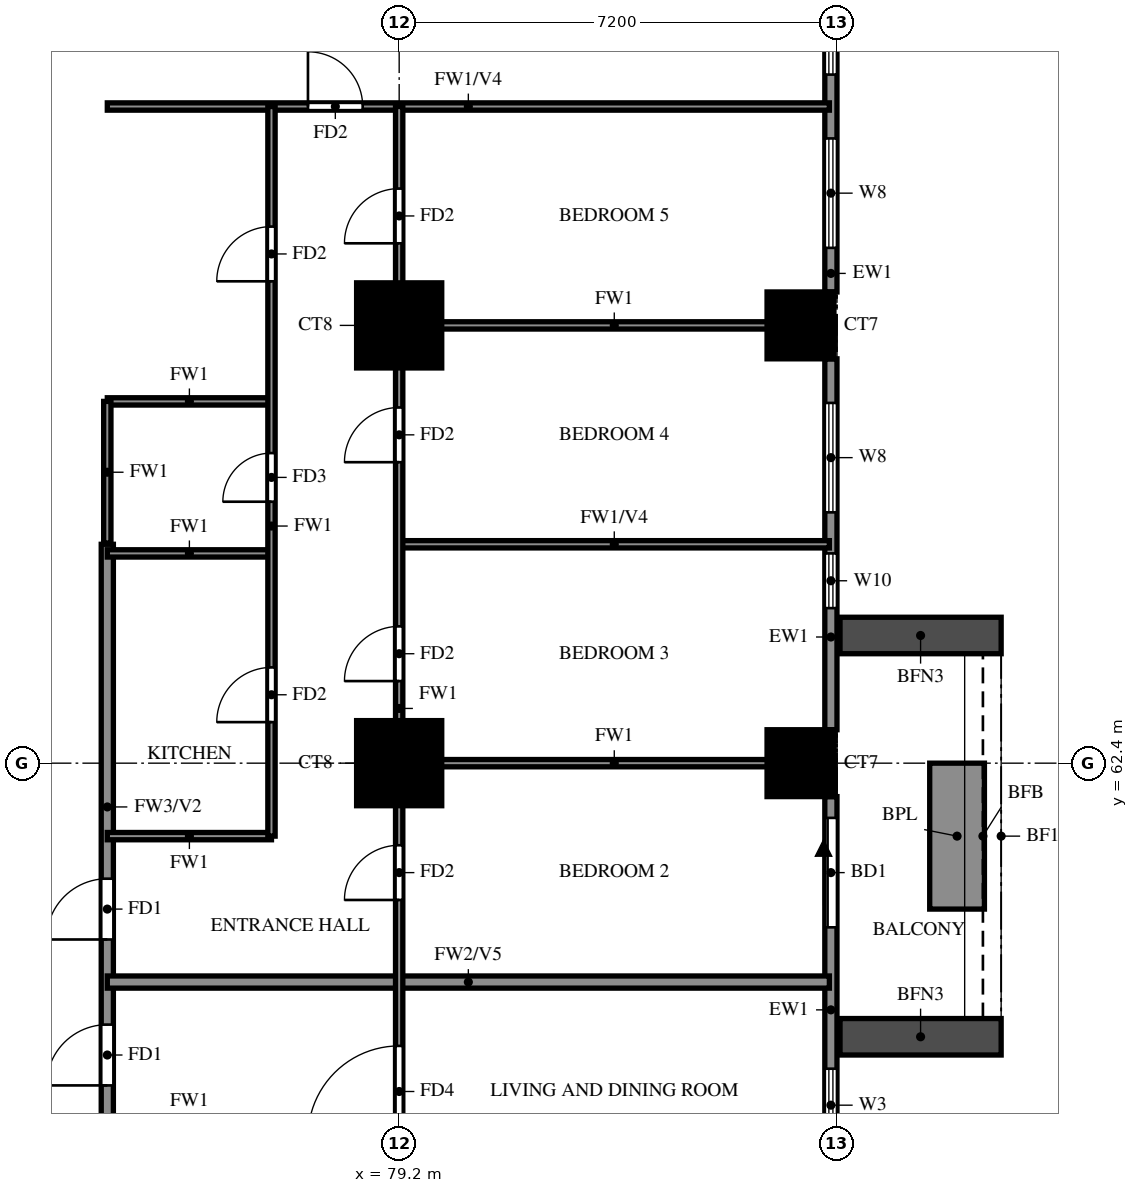
"""IFC4 building model, lengths in metres.
Left out: names, types, materials, properties, quantities, classifications, styles, units other than length and angle.
Written with IfcOpenShell. Run it as: python <this file> out.ifc"""

import sys

from ifc_helpers import new_model, si_unit, direction, frame, frame_2d, origin, origin_2d, place, context, subcontext, project, spatial, rectangle, extrude, source, transform, mapped, element, fill, save


model = new_model("IFC4")
c1 = context("Model", 3, precision=1e-05, world=origin(), true_north=direction((0.0, 1.0)))
c2 = subcontext(c1, "Body", "Model", "MODEL_VIEW")
j1 = project(units=[si_unit("LENGTHUNIT", "METRE"), si_unit("PLANEANGLEUNIT", "RADIAN")], contexts=[c1])
p1 = place(None, origin())
s1 = spatial("IfcSite", under=j1, at=p1, CompositionType="ELEMENT")
p2 = place(p1, origin())
s2 = spatial("IfcBuilding", under=s1, at=p2, CompositionType="ELEMENT")
p3 = place(p2, frame((0.0, 0.0, 34.0)))
s3 = spatial("IfcBuildingStorey", under=s2, at=p3, CompositionType="ELEMENT", Elevation=34.0)
m1 = source(origin(), c2, "Body", "SweptSolid", [
    extrude(rectangle(XDim=1.4, YDim=1.4, at=origin_2d()), origin(), (0.0, 0.0, 1.0), 3.18),
])
p4 = place(p3, frame((79.2, 62.4, 0.0), z_axis=(0.0, 0.0, 1.0), x_axis=(1.0, 0.0, 0.0)))
e1 = element("IfcColumn", 1, at=p4, inside=s3, PredefinedType="COLUMN", context=c2, shape_type="MappedRepresentation", body=[
    mapped(m1, transform((0.0, 0.0, 0.0))),
])
m2 = source(origin(), c2, "Body", "SweptSolid", [
    extrude(rectangle(XDim=1.1, YDim=1.1, at=origin_2d()), origin(), (0.0, 0.0, 1.0), 3.18),
])
p5 = place(p3, frame((85.8, 62.4, 0.0), z_axis=(0.0, 0.0, 1.0), x_axis=(1.0, 0.0, 0.0)))
e2 = element("IfcColumn", 2, at=p5, inside=s3, PredefinedType="COLUMN", context=c2, shape_type="MappedRepresentation", body=[
    mapped(m2, transform((0.0, 0.0, 0.0))),
])
p6 = place(p3, frame((79.2, 69.6, 0.0), z_axis=(0.0, 0.0, 1.0), x_axis=(1.0, 0.0, 0.0)))
e3 = element("IfcColumn", 3, at=p6, inside=s3, PredefinedType="COLUMN", context=c2, shape_type="MappedRepresentation", body=[
    mapped(m1, transform((0.0, 0.0, 0.0))),
])
p7 = place(p3, frame((85.8, 69.6, 0.0), z_axis=(0.0, 0.0, 1.0), x_axis=(1.0, 0.0, 0.0)))
e4 = element("IfcColumn", 4, at=p7, inside=s3, PredefinedType="COLUMN", context=c2, shape_type="MappedRepresentation", body=[
    mapped(m2, transform((0.0, 0.0, 0.0))),
])
p8 = place(p3, frame((86.3, 55.75, 0.0), z_axis=(0.0, 0.0, 1.0), x_axis=(0.0, 1.0, 0.0)))
e5 = element("IfcWall", 5, at=p8, inside=s3, PredefinedType="SOLIDWALL", context=c2, shape_type="SweptSolid", body=[
    extrude(rectangle(XDim=6.1, YDim=0.2, at=frame_2d((3.05, 0.0))), origin(), (0.0, 0.0, 1.0), 3.18),
])
p9 = place(p8, frame((3.95, 0.0, 0.0)))
e6 = element("IfcOpeningElement", 6, at=p9, cuts=e5, PredefinedType="OPENING", context=c2, shape_type="SweptSolid", body=[
    extrude(rectangle(XDim=1.8, YDim=2.4, at=frame_2d((0.9, 1.2))), frame((0.0, 0.11, 0.0), z_axis=(0.0, -1.0, 0.0), x_axis=(1.0, 0.0, 0.0)), (0.0, 0.0, 1.0), 0.22),
])
p10 = place(p8, frame((0.425, 0.0, 0.6)))
e7 = element("IfcOpeningElement", 7, at=p10, cuts=e5, PredefinedType="OPENING", context=c2, shape_type="SweptSolid", body=[
    extrude(rectangle(XDim=1.2, YDim=2.4, at=frame_2d((0.6, 1.2))), frame((0.0, 0.11, 0.0), z_axis=(0.0, -1.0, 0.0), x_axis=(1.0, 0.0, 0.0)), (0.0, 0.0, 1.0), 0.22),
])
p11 = place(p3, frame((86.3, 62.95, 0.0), z_axis=(0.0, 0.0, 1.0), x_axis=(0.0, 1.0, 0.0)))
e8 = element("IfcWall", 8, at=p11, inside=s3, PredefinedType="SOLIDWALL", context=c2, shape_type="SweptSolid", body=[
    extrude(rectangle(XDim=6.1, YDim=0.2, at=frame_2d((3.05, 0.0))), origin(), (0.0, 0.0, 1.0), 3.18),
])
p12 = place(p11, frame((2.0, 0.0, 0.6)))
e9 = element("IfcOpeningElement", 9, at=p12, cuts=e8, PredefinedType="OPENING", context=c2, shape_type="SweptSolid", body=[
    extrude(rectangle(XDim=0.9, YDim=2.4, at=frame_2d((0.45, 1.2))), frame((0.0, 0.11, 0.0), z_axis=(0.0, -1.0, 0.0), x_axis=(1.0, 0.0, 0.0)), (0.0, 0.0, 1.0), 0.22),
])
p13 = place(p11, frame((3.575, 0.0, 0.6)))
e10 = element("IfcOpeningElement", 10, at=p13, cuts=e8, PredefinedType="OPENING", context=c2, shape_type="SweptSolid", body=[
    extrude(rectangle(XDim=1.8, YDim=2.4, at=frame_2d((0.9, 1.2))), frame((0.0, 0.11, 0.0), z_axis=(0.0, -1.0, 0.0), x_axis=(1.0, 0.0, 0.0)), (0.0, 0.0, 1.0), 0.22),
])
p14 = place(p3, frame((86.3, 70.15, 0.0), z_axis=(0.0, 0.0, 1.0), x_axis=(0.0, 1.0, 0.0)))
e11 = element("IfcWall", 11, at=p14, inside=s3, PredefinedType="SOLIDWALL", context=c2, shape_type="SweptSolid", body=[
    extrude(rectangle(XDim=6.1, YDim=0.2, at=frame_2d((3.05, 0.0))), origin(), (0.0, 0.0, 1.0), 3.18),
])
p15 = place(p14, frame((0.725, 0.0, 0.6)))
e12 = element("IfcOpeningElement", 12, at=p15, cuts=e11, PredefinedType="OPENING", context=c2, shape_type="SweptSolid", body=[
    extrude(rectangle(XDim=1.8, YDim=2.4, at=frame_2d((0.9, 1.2))), frame((0.0, 0.11, 0.0), z_axis=(0.0, -1.0, 0.0), x_axis=(1.0, 0.0, 0.0)), (0.0, 0.0, 1.0), 0.22),
])
p16 = place(p14, frame((3.575, 0.0, 0.6)))
e13 = element("IfcOpeningElement", 13, at=p16, cuts=e11, PredefinedType="OPENING", context=c2, shape_type="SweptSolid", body=[
    extrude(rectangle(XDim=1.8, YDim=2.4, at=frame_2d((0.9, 1.2))), frame((0.0, 0.11, 0.0), z_axis=(0.0, -1.0, 0.0), x_axis=(1.0, 0.0, 0.0)), (0.0, 0.0, 1.0), 0.22),
])
for number, where, z_axis, x_axis in (
    (14, (86.45, 57.9, 0.0), (0.0, 0.0, 1.0), (1.0, 0.0, 0.0)),
    (15, (86.45, 64.5, 0.0), (0.0, 0.0, 1.0), (1.0, 0.0, 0.0)),
):
    element("IfcWall", number, at=place(p3, frame(where, z_axis=z_axis, x_axis=x_axis)), inside=s3, PredefinedType="SOLIDWALL", context=c2, shape_type="SweptSolid", body=[
        extrude(rectangle(XDim=2.65, YDim=0.6, at=frame_2d((1.325, 0.0))), origin(), (0.0, 0.0, 1.0), 2.85),
    ])
p17 = place(p3, frame((88.375, 60.0, 0.0), z_axis=(0.0, 0.0, 1.0), x_axis=(0.0, 1.0, 0.0)))
e16 = element("IfcWall", 16, at=p17, inside=s3, PredefinedType="SOLIDWALL", context=c2, shape_type="SweptSolid", body=[
    extrude(rectangle(XDim=2.4, YDim=0.9, at=frame_2d((1.2, 0.0))), origin(), (0.0, 0.0, 1.0), 0.9),
])
p18 = place(p3, frame((74.4, 56.4, 0.0), z_axis=(0.0, 0.0, 1.0), x_axis=(0.0, 1.0, 0.0)))
e17 = element("IfcWall", 17, at=p18, inside=s3, PredefinedType="SOLIDWALL", context=c2, shape_type="SweptSolid", body=[
    extrude(rectangle(XDim=9.6, YDim=0.2, at=frame_2d((4.8, 0.0))), origin(), (0.0, 0.0, 1.0), 3.18),
])
p19 = place(p18, frame((0.7, 0.0, 0.0)))
e18 = element("IfcOpeningElement", 18, at=p19, cuts=e17, PredefinedType="OPENING", context=c2, shape_type="SweptSolid", body=[
    extrude(rectangle(XDim=1.0, YDim=2.1, at=frame_2d((0.5, 1.05))), frame((0.0, 0.11, 0.0), z_axis=(0.0, -1.0, 0.0), x_axis=(1.0, 0.0, 0.0)), (0.0, 0.0, 1.0), 0.22),
])
p20 = place(p18, frame((3.1, 0.0, 0.0)))
e19 = element("IfcOpeningElement", 19, at=p20, cuts=e17, PredefinedType="OPENING", context=c2, shape_type="SweptSolid", body=[
    extrude(rectangle(XDim=1.0, YDim=2.1, at=frame_2d((0.5, 1.05))), frame((0.0, 0.11, 0.0), z_axis=(0.0, -1.0, 0.0), x_axis=(1.0, 0.0, 0.0)), (0.0, 0.0, 1.0), 0.22),
])
p21 = place(p3, frame((74.4, 58.8, 0.0), z_axis=(0.0, 0.0, 1.0), x_axis=(1.0, 0.0, 0.0)))
e20 = element("IfcWall", 20, at=p21, inside=s3, PredefinedType="SOLIDWALL", context=c2, shape_type="SweptSolid", body=[
    extrude(rectangle(XDim=11.875, YDim=0.2, at=frame_2d((5.938, 0.0))), origin(), (0.0, 0.0, 1.0), 2.28),
])
p22 = place(p3, frame((74.4, 61.2, 0.0), z_axis=(0.0, 0.0, 1.0), x_axis=(1.0, 0.0, 0.0)))
e21 = element("IfcWall", 21, at=p22, inside=s3, PredefinedType="PARTITIONING", context=c2, shape_type="SweptSolid", body=[
    extrude(rectangle(XDim=2.7, YDim=0.12, at=frame_2d((1.35, 0.0))), origin(), (0.0, 0.0, 1.0), 3.18),
])
p23 = place(p3, frame((79.2, 62.4, 0.0), z_axis=(0.0, 0.0, 1.0), x_axis=(1.0, 0.0, 0.0)))
e22 = element("IfcWall", 22, at=p23, inside=s3, PredefinedType="PARTITIONING", context=c2, shape_type="SweptSolid", body=[
    extrude(rectangle(XDim=7.075, YDim=0.12, at=frame_2d((3.538, 0.0))), origin(), (0.0, 0.0, 1.0), 3.18),
])
p24 = place(p3, frame((74.4, 65.85, 0.0), z_axis=(0.0, 0.0, 1.0), x_axis=(1.0, 0.0, 0.0)))
e23 = element("IfcWall", 23, at=p24, inside=s3, PredefinedType="PARTITIONING", context=c2, shape_type="SweptSolid", body=[
    extrude(rectangle(XDim=2.7, YDim=0.12, at=frame_2d((1.35, 0.0))), origin(), (0.0, 0.0, 1.0), 3.18),
])
p25 = place(p3, frame((79.2, 66.0, 0.0), z_axis=(0.0, 0.0, 1.0), x_axis=(1.0, 0.0, 0.0)))
e24 = element("IfcWall", 24, at=p25, inside=s3, PredefinedType="PARTITIONING", context=c2, shape_type="SweptSolid", body=[
    extrude(rectangle(XDim=7.075, YDim=0.12, at=frame_2d((3.538, 0.0))), origin(), (0.0, 0.0, 1.0), 2.28),
])
p26 = place(p3, frame((74.4, 68.35, 0.0), z_axis=(0.0, 0.0, 1.0), x_axis=(1.0, 0.0, 0.0)))
e25 = element("IfcWall", 25, at=p26, inside=s3, PredefinedType="PARTITIONING", context=c2, shape_type="SweptSolid", body=[
    extrude(rectangle(XDim=2.7, YDim=0.12, at=frame_2d((1.35, 0.0))), origin(), (0.0, 0.0, 1.0), 3.18),
])
p27 = place(p3, frame((79.2, 69.6, 0.0), z_axis=(0.0, 0.0, 1.0), x_axis=(1.0, 0.0, 0.0)))
e26 = element("IfcWall", 26, at=p27, inside=s3, PredefinedType="PARTITIONING", context=c2, shape_type="SweptSolid", body=[
    extrude(rectangle(XDim=7.075, YDim=0.12, at=frame_2d((3.538, 0.0))), origin(), (0.0, 0.0, 1.0), 3.18),
])
p28 = place(p3, frame((74.4, 73.2, 0.0), z_axis=(0.0, 0.0, 1.0), x_axis=(1.0, 0.0, 0.0)))
e27 = element("IfcWall", 27, at=p28, inside=s3, PredefinedType="PARTITIONING", context=c2, shape_type="SweptSolid", body=[
    extrude(rectangle(XDim=11.875, YDim=0.12, at=frame_2d((5.938, 0.0))), origin(), (0.0, 0.0, 1.0), 2.28),
])
p29 = place(p28, frame((3.3, 0.0, 0.0)))
e28 = element("IfcOpeningElement", 28, at=p29, cuts=e27, PredefinedType="OPENING", context=c2, shape_type="SweptSolid", body=[
    extrude(rectangle(XDim=0.9, YDim=2.1, at=frame_2d((0.45, 1.05))), frame((0.0, 0.07, 0.0), z_axis=(0.0, -1.0, 0.0), x_axis=(1.0, 0.0, 0.0)), (0.0, 0.0, 1.0), 0.14),
])
p30 = place(p3, frame((74.4, 66.02, 0.0), z_axis=(0.0, 0.0, 1.0), x_axis=(0.0, 1.0, 0.0)))
e29 = element("IfcWall", 29, at=p30, inside=s3, PredefinedType="PARTITIONING", context=c2, shape_type="SweptSolid", body=[
    extrude(rectangle(XDim=2.33, YDim=0.12, at=frame_2d((1.165, 0.0))), origin(), (0.0, 0.0, 1.0), 3.18),
])
p31 = place(p3, frame((77.1, 61.2, 0.0), z_axis=(0.0, 0.0, 1.0), x_axis=(0.0, 1.0, 0.0)))
e30 = element("IfcWall", 30, at=p31, inside=s3, PredefinedType="PARTITIONING", context=c2, shape_type="SweptSolid", body=[
    extrude(rectangle(XDim=12.0, YDim=0.12, at=frame_2d((6.0, 0.0))), origin(), (0.0, 0.0, 1.0), 3.18),
])
p32 = place(p31, frame((1.875, 0.0, 0.0)))
e31 = element("IfcOpeningElement", 31, at=p32, cuts=e30, PredefinedType="OPENING", context=c2, shape_type="SweptSolid", body=[
    extrude(rectangle(XDim=0.9, YDim=2.1, at=frame_2d((0.45, 1.05))), frame((0.0, 0.07, 0.0), z_axis=(0.0, -1.0, 0.0), x_axis=(1.0, 0.0, 0.0)), (0.0, 0.0, 1.0), 0.14),
])
p33 = place(p31, frame((5.5, 0.0, 0.0)))
e32 = element("IfcOpeningElement", 32, at=p33, cuts=e30, PredefinedType="OPENING", context=c2, shape_type="SweptSolid", body=[
    extrude(rectangle(XDim=0.8, YDim=2.1, at=frame_2d((0.4, 1.05))), frame((0.0, 0.07, 0.0), z_axis=(0.0, -1.0, 0.0), x_axis=(1.0, 0.0, 0.0)), (0.0, 0.0, 1.0), 0.14),
])
p34 = place(p31, frame((9.125, 0.0, 0.0)))
e33 = element("IfcOpeningElement", 33, at=p34, cuts=e30, PredefinedType="OPENING", context=c2, shape_type="SweptSolid", body=[
    extrude(rectangle(XDim=0.9, YDim=2.1, at=frame_2d((0.45, 1.05))), frame((0.0, 0.07, 0.0), z_axis=(0.0, -1.0, 0.0), x_axis=(1.0, 0.0, 0.0)), (0.0, 0.0, 1.0), 0.14),
])
p35 = place(p3, frame((79.2, 55.2, 0.0), z_axis=(0.0, 0.0, 1.0), x_axis=(0.0, 1.0, 0.0)))
e34 = element("IfcWall", 34, at=p35, inside=s3, PredefinedType="PARTITIONING", context=c2, shape_type="SweptSolid", body=[
    extrude(rectangle(XDim=18.0, YDim=0.12, at=frame_2d((9.0, 0.0))), origin(), (0.0, 0.0, 1.0), 3.18),
])
p36 = place(p35, frame((1.05, 0.0, 0.0)))
e35 = element("IfcOpeningElement", 35, at=p36, cuts=e34, PredefinedType="OPENING", context=c2, shape_type="SweptSolid", body=[
    extrude(rectangle(XDim=1.5, YDim=2.1, at=frame_2d((0.75, 1.05))), frame((0.0, 0.07, 0.0), z_axis=(0.0, -1.0, 0.0), x_axis=(1.0, 0.0, 0.0)), (0.0, 0.0, 1.0), 0.14),
])
p37 = place(p35, frame((4.95, 0.0, 0.0)))
e36 = element("IfcOpeningElement", 36, at=p37, cuts=e34, PredefinedType="OPENING", context=c2, shape_type="SweptSolid", body=[
    extrude(rectangle(XDim=0.9, YDim=2.1, at=frame_2d((0.45, 1.05))), frame((0.0, 0.07, 0.0), z_axis=(0.0, -1.0, 0.0), x_axis=(1.0, 0.0, 0.0)), (0.0, 0.0, 1.0), 0.14),
])
p38 = place(p35, frame((8.55, 0.0, 0.0)))
e37 = element("IfcOpeningElement", 37, at=p38, cuts=e34, PredefinedType="OPENING", context=c2, shape_type="SweptSolid", body=[
    extrude(rectangle(XDim=0.9, YDim=2.1, at=frame_2d((0.45, 1.05))), frame((0.0, 0.07, 0.0), z_axis=(0.0, -1.0, 0.0), x_axis=(1.0, 0.0, 0.0)), (0.0, 0.0, 1.0), 0.14),
])
p39 = place(p35, frame((12.15, 0.0, 0.0)))
e38 = element("IfcOpeningElement", 38, at=p39, cuts=e34, PredefinedType="OPENING", context=c2, shape_type="SweptSolid", body=[
    extrude(rectangle(XDim=0.9, YDim=2.1, at=frame_2d((0.45, 1.05))), frame((0.0, 0.07, 0.0), z_axis=(0.0, -1.0, 0.0), x_axis=(1.0, 0.0, 0.0)), (0.0, 0.0, 1.0), 0.14),
])
p40 = place(p35, frame((15.75, 0.0, 0.0)))
e39 = element("IfcOpeningElement", 39, at=p40, cuts=e34, PredefinedType="OPENING", context=c2, shape_type="SweptSolid", body=[
    extrude(rectangle(XDim=0.9, YDim=2.1, at=frame_2d((0.45, 1.05))), frame((0.0, 0.07, 0.0), z_axis=(0.0, -1.0, 0.0), x_axis=(1.0, 0.0, 0.0)), (0.0, 0.0, 1.0), 0.14),
])
p41 = place(p9, origin())
e40 = element("IfcDoor", 40, at=p41, inside=s3, OperationType="DOUBLE_DOOR_SLIDING", PredefinedType="DOOR", context=c2, shape_type="SweptSolid", body=[
    extrude(rectangle(XDim=1.8, YDim=2.4, at=frame_2d((0.9, 1.2))), frame((0.0, 0.025, 0.0), z_axis=(0.0, -1.0, 0.0), x_axis=(1.0, 0.0, 0.0)), (0.0, 0.0, 1.0), 0.05),
])
fill(e6, e40)
p42 = place(p10, origin())
e41 = element("IfcWindow", 41, at=p42, inside=s3, PartitioningType="SINGLE_PANEL", PredefinedType="WINDOW", context=c2, shape_type="SweptSolid", body=[
    extrude(rectangle(XDim=1.2, YDim=2.4, at=frame_2d((0.6, 1.2))), frame((0.0, 0.03, 0.0), z_axis=(0.0, -1.0, 0.0), x_axis=(1.0, 0.0, 0.0)), (0.0, 0.0, 1.0), 0.06),
])
fill(e7, e41)
p43 = place(p12, origin())
e42 = element("IfcWindow", 42, at=p43, inside=s3, PartitioningType="SINGLE_PANEL", PredefinedType="WINDOW", context=c2, shape_type="SweptSolid", body=[
    extrude(rectangle(XDim=0.9, YDim=2.4, at=frame_2d((0.45, 1.2))), frame((0.0, 0.03, 0.0), z_axis=(0.0, -1.0, 0.0), x_axis=(1.0, 0.0, 0.0)), (0.0, 0.0, 1.0), 0.06),
])
fill(e9, e42)
p44 = place(p13, origin())
e43 = element("IfcWindow", 43, at=p44, inside=s3, PartitioningType="DOUBLE_PANEL_VERTICAL", PredefinedType="WINDOW", context=c2, shape_type="SweptSolid", body=[
    extrude(rectangle(XDim=1.8, YDim=2.4, at=frame_2d((0.9, 1.2))), frame((0.0, 0.03, 0.0), z_axis=(0.0, -1.0, 0.0), x_axis=(1.0, 0.0, 0.0)), (0.0, 0.0, 1.0), 0.06),
])
fill(e10, e43)
p45 = place(p15, origin())
e44 = element("IfcWindow", 44, at=p45, inside=s3, PartitioningType="DOUBLE_PANEL_VERTICAL", PredefinedType="WINDOW", context=c2, shape_type="SweptSolid", body=[
    extrude(rectangle(XDim=1.8, YDim=2.4, at=frame_2d((0.9, 1.2))), frame((0.0, 0.03, 0.0), z_axis=(0.0, -1.0, 0.0), x_axis=(1.0, 0.0, 0.0)), (0.0, 0.0, 1.0), 0.06),
])
fill(e12, e44)
p46 = place(p16, origin())
e45 = element("IfcWindow", 45, at=p46, inside=s3, PartitioningType="DOUBLE_PANEL_VERTICAL", PredefinedType="WINDOW", context=c2, shape_type="SweptSolid", body=[
    extrude(rectangle(XDim=1.8, YDim=2.4, at=frame_2d((0.9, 1.2))), frame((0.0, 0.03, 0.0), z_axis=(0.0, -1.0, 0.0), x_axis=(1.0, 0.0, 0.0)), (0.0, 0.0, 1.0), 0.06),
])
fill(e13, e45)
p47 = place(p19, origin())
e46 = element("IfcDoor", 46, at=p47, inside=s3, OperationType="SINGLE_SWING_RIGHT", PredefinedType="DOOR", context=c2, shape_type="SweptSolid", body=[
    extrude(rectangle(XDim=1.0, YDim=2.1, at=frame_2d((0.5, 1.05))), frame((0.0, 0.025, 0.0), z_axis=(0.0, -1.0, 0.0), x_axis=(1.0, 0.0, 0.0)), (0.0, 0.0, 1.0), 0.05),
])
fill(e18, e46)
p48 = place(p36, origin())
e47 = element("IfcDoor", 47, at=p48, inside=s3, OperationType="SINGLE_SWING_RIGHT", PredefinedType="DOOR", context=c2, shape_type="SweptSolid", body=[
    extrude(rectangle(XDim=1.5, YDim=2.1, at=frame_2d((0.75, 1.05))), frame((0.0, 0.025, 0.0), z_axis=(0.0, -1.0, 0.0), x_axis=(1.0, 0.0, 0.0)), (0.0, 0.0, 1.0), 0.05),
])
fill(e35, e47)
p49 = place(p20, origin())
e48 = element("IfcDoor", 48, at=p49, inside=s3, OperationType="SINGLE_SWING_LEFT", PredefinedType="DOOR", context=c2, shape_type="SweptSolid", body=[
    extrude(rectangle(XDim=1.0, YDim=2.1, at=frame_2d((0.5, 1.05))), frame((0.0, 0.025, 0.0), z_axis=(0.0, -1.0, 0.0), x_axis=(1.0, 0.0, 0.0)), (0.0, 0.0, 1.0), 0.05),
])
fill(e19, e48)
p50 = place(p37, origin())
e49 = element("IfcDoor", 49, at=p50, inside=s3, OperationType="SINGLE_SWING_RIGHT", PredefinedType="DOOR", context=c2, shape_type="SweptSolid", body=[
    extrude(rectangle(XDim=0.9, YDim=2.1, at=frame_2d((0.45, 1.05))), frame((0.0, 0.025, 0.0), z_axis=(0.0, -1.0, 0.0), x_axis=(1.0, 0.0, 0.0)), (0.0, 0.0, 1.0), 0.05),
])
fill(e36, e49)
p51 = place(p38, origin())
e50 = element("IfcDoor", 50, at=p51, inside=s3, OperationType="SINGLE_SWING_LEFT", PredefinedType="DOOR", context=c2, shape_type="SweptSolid", body=[
    extrude(rectangle(XDim=0.9, YDim=2.1, at=frame_2d((0.45, 1.05))), frame((0.0, 0.025, 0.0), z_axis=(0.0, -1.0, 0.0), x_axis=(1.0, 0.0, 0.0)), (0.0, 0.0, 1.0), 0.05),
])
fill(e37, e50)
p52 = place(p39, origin())
e51 = element("IfcDoor", 51, at=p52, inside=s3, OperationType="SINGLE_SWING_LEFT", PredefinedType="DOOR", context=c2, shape_type="SweptSolid", body=[
    extrude(rectangle(XDim=0.9, YDim=2.1, at=frame_2d((0.45, 1.05))), frame((0.0, 0.025, 0.0), z_axis=(0.0, -1.0, 0.0), x_axis=(1.0, 0.0, 0.0)), (0.0, 0.0, 1.0), 0.05),
])
fill(e38, e51)
p53 = place(p40, origin())
e52 = element("IfcDoor", 52, at=p53, inside=s3, OperationType="SINGLE_SWING_RIGHT", PredefinedType="DOOR", context=c2, shape_type="SweptSolid", body=[
    extrude(rectangle(XDim=0.9, YDim=2.1, at=frame_2d((0.45, 1.05))), frame((0.0, 0.025, 0.0), z_axis=(0.0, -1.0, 0.0), x_axis=(1.0, 0.0, 0.0)), (0.0, 0.0, 1.0), 0.05),
])
fill(e39, e52)
p54 = place(p29, origin())
e53 = element("IfcDoor", 53, at=p54, inside=s3, OperationType="SINGLE_SWING_LEFT", PredefinedType="DOOR", context=c2, shape_type="SweptSolid", body=[
    extrude(rectangle(XDim=0.9, YDim=2.1, at=frame_2d((0.45, 1.05))), frame((0.0, 0.025, 0.0), z_axis=(0.0, -1.0, 0.0), x_axis=(1.0, 0.0, 0.0)), (0.0, 0.0, 1.0), 0.05),
])
fill(e28, e53)
p55 = place(p32, origin())
e54 = element("IfcDoor", 54, at=p55, inside=s3, OperationType="SINGLE_SWING_LEFT", PredefinedType="DOOR", context=c2, shape_type="SweptSolid", body=[
    extrude(rectangle(XDim=0.9, YDim=2.1, at=frame_2d((0.45, 1.05))), frame((0.0, 0.025, 0.0), z_axis=(0.0, -1.0, 0.0), x_axis=(1.0, 0.0, 0.0)), (0.0, 0.0, 1.0), 0.05),
])
fill(e31, e54)
p56 = place(p33, origin())
e55 = element("IfcDoor", 55, at=p56, inside=s3, OperationType="SINGLE_SWING_RIGHT", PredefinedType="DOOR", context=c2, shape_type="SweptSolid", body=[
    extrude(rectangle(XDim=0.8, YDim=2.1, at=frame_2d((0.4, 1.05))), frame((0.0, 0.025, 0.0), z_axis=(0.0, -1.0, 0.0), x_axis=(1.0, 0.0, 0.0)), (0.0, 0.0, 1.0), 0.05),
])
fill(e32, e55)
p57 = place(p34, origin())
e56 = element("IfcDoor", 56, at=p57, inside=s3, OperationType="SINGLE_SWING_LEFT", PredefinedType="DOOR", context=c2, shape_type="SweptSolid", body=[
    extrude(rectangle(XDim=0.9, YDim=2.1, at=frame_2d((0.45, 1.05))), frame((0.0, 0.025, 0.0), z_axis=(0.0, -1.0, 0.0), x_axis=(1.0, 0.0, 0.0)), (0.0, 0.0, 1.0), 0.05),
])
fill(e33, e56)
save(model, sys.argv[1])
